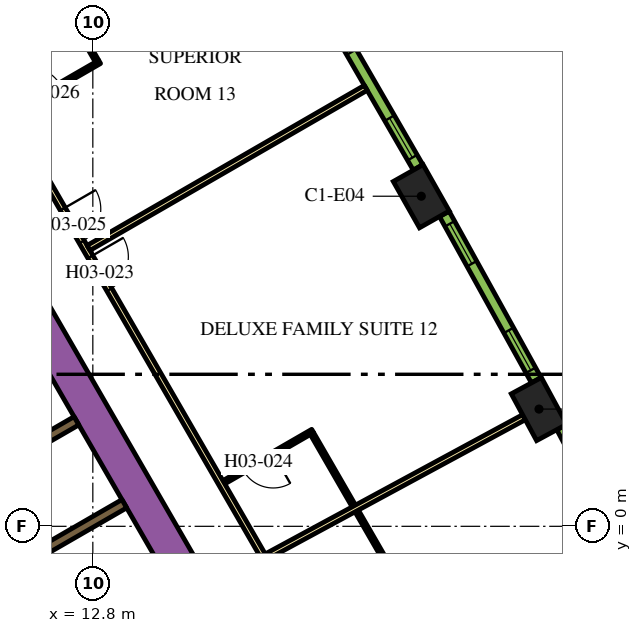
"""IFC4 building model, lengths in metres.
Left out: names, types, materials, properties, quantities, classifications, styles, units other than length and angle.
Written with IfcOpenShell. Run it as: python <this file> out.ifc"""

import sys

from ifc_helpers import new_model, si_unit, direction, frame, frame_2d, origin, origin_2d, place, context, subcontext, project, spatial, rectangle, extrude, element, fill, save


model = new_model("IFC4")
c1 = context("Model", 3, precision=1e-05, world=origin(), true_north=direction((0.0, 1.0)))
c2 = subcontext(c1, "Body", "Model", "MODEL_VIEW")
j1 = project(units=[si_unit("LENGTHUNIT", "METRE"), si_unit("PLANEANGLEUNIT", "RADIAN")], contexts=[c1])
p1 = place(None, origin())
s1 = spatial("IfcSite", under=j1, at=p1, CompositionType="ELEMENT")
p2 = place(p1, origin())
s2 = spatial("IfcBuilding", under=s1, at=p2, CompositionType="ELEMENT")
p3 = place(p2, frame((0.0, 0.0, 54.9)))
s3 = spatial("IfcBuildingStorey", under=s2, at=p3, CompositionType="ELEMENT", Elevation=54.9)
for number, where, z_axis, x_axis in (
    (1, (24.54, 3.085, 0.0), (0.0, 0.0, 1.0), (-0.476, 0.88, 0.0)),
    (2, (21.443, 8.685, 0.0), (0.0, 0.0, 1.0), (-0.492, 0.871, 0.0)),
):
    element("IfcColumn", number, at=place(p3, frame(where, z_axis=z_axis, x_axis=x_axis)), inside=s3, PredefinedType="COLUMN", context=c2, shape_type="SweptSolid", body=[
        extrude(rectangle(XDim=1.4, YDim=0.9, at=origin_2d()), origin(), (0.0, 0.0, 1.0), 3.9),
    ])
p4 = place(p3, frame((6.776, 13.364, 0.0), z_axis=(0.0, 0.0, 1.0), x_axis=(0.500004177138, -0.8660229921, 0.0)))
e3 = element("IfcWall", 3, at=p4, inside=s3, PredefinedType="SOLIDWALL", context=c2, shape_type="SweptSolid", body=[
    extrude(rectangle(XDim=20.204, YDim=0.9, at=frame_2d((10.102, 0.0))), origin(), (0.0, 0.0, 1.0), 3.9),
])
p5 = place(p3, frame((10.464, 1.677, 0.0), z_axis=(0.0, 0.0, 1.0), x_axis=(0.86605622881, 0.499946605688, 0.0)))
e4 = element("IfcWall", 4, at=p5, inside=s3, PredefinedType="SOLIDWALL", context=c2, shape_type="SweptSolid", body=[
    extrude(rectangle(XDim=2.2, YDim=0.25, at=frame_2d((1.1, 0.0))), origin(), (0.0, 0.0, 1.0), 3.9),
])
p6 = place(p3, frame((10.911, -0.975, 0.0), z_axis=(0.0, 0.0, 1.0), x_axis=(0.866046979468, 0.499962627957, 0.0)))
e5 = element("IfcWall", 5, at=p6, inside=s3, PredefinedType="SOLIDWALL", context=c2, shape_type="SweptSolid", body=[
    extrude(rectangle(XDim=3.138, YDim=0.25, at=frame_2d((1.569, 0.0))), origin(), (0.0, 0.0, 1.0), 3.9),
])
p7 = place(p3, frame((6.163, 18.475, 0.0), z_axis=(0.0, 0.0, 1.0), x_axis=(0.500001317485, -0.866024643133, 0.0)))
e6 = element("IfcWall", 6, at=p7, inside=s3, PredefinedType="PARTITIONING", context=c2, shape_type="SweptSolid", body=[
    extrude(rectangle(XDim=25.767, YDim=0.15, at=frame_2d((12.883, 0.0))), origin(), (0.0, 0.0, 1.0), 2.75),
])
p8 = place(p7, frame((24.586, 0.0, 0.0)))
e7 = element("IfcOpeningElement", 7, at=p8, cuts=e6, PredefinedType="OPENING", context=c2, shape_type="SweptSolid", body=[
    extrude(rectangle(XDim=1.0, YDim=2.1, at=frame_2d((0.5, 1.05))), frame((0.0, 0.085, 0.0), z_axis=(0.0, -1.0, 0.0), x_axis=(1.0, 0.0, 0.0)), (0.0, 0.0, 1.0), 0.17),
])
p9 = place(p7, frame((13.144, 0.0, 0.0)))
e8 = element("IfcOpeningElement", 8, at=p9, cuts=e6, PredefinedType="OPENING", context=c2, shape_type="SweptSolid", body=[
    extrude(rectangle(XDim=1.0, YDim=2.1, at=frame_2d((0.5, 1.05))), frame((0.0, 0.085, 0.0), z_axis=(0.0, -1.0, 0.0), x_axis=(1.0, 0.0, 0.0)), (0.0, 0.0, 1.0), 0.17),
])
p10 = place(p7, frame((11.692, 0.0, 0.0)))
e9 = element("IfcOpeningElement", 9, at=p10, cuts=e6, PredefinedType="OPENING", context=c2, shape_type="SweptSolid", body=[
    extrude(rectangle(XDim=1.0, YDim=2.1, at=frame_2d((0.5, 1.05))), frame((0.0, 0.085, 0.0), z_axis=(0.0, -1.0, 0.0), x_axis=(1.0, 0.0, 0.0)), (0.0, 0.0, 1.0), 0.17),
])
p11 = place(p7, frame((0.572, 0.0, 0.0)))
e10 = element("IfcOpeningElement", 10, at=p11, cuts=e6, PredefinedType="OPENING", context=c2, shape_type="SweptSolid", body=[
    extrude(rectangle(XDim=1.0, YDim=2.1, at=frame_2d((0.5, 1.05))), frame((0.0, 0.085, 0.0), z_axis=(0.0, -1.0, 0.0), x_axis=(1.0, 0.0, 0.0)), (0.0, 0.0, 1.0), 0.17),
])
p12 = place(p3, frame((19.982, 11.537, 0.0), z_axis=(0.0, 0.0, 1.0), x_axis=(-0.866020994654, -0.500007636761, 0.0)))
e11 = element("IfcWall", 11, at=p12, inside=s3, PredefinedType="PARTITIONING", context=c2, shape_type="SweptSolid", body=[
    extrude(rectangle(XDim=8.423, YDim=0.15, at=frame_2d((4.211, 0.0))), origin(), (0.0, 0.0, 1.0), 2.75),
])
p13 = place(p3, frame((24.145, 2.871, 0.0), z_axis=(0.0, 0.0, 1.0), x_axis=(-0.879551725039, -0.475803281809, 0.0)))
e12 = element("IfcWall", 12, at=p13, inside=s3, PredefinedType="PARTITIONING", context=c2, shape_type="SweptSolid", body=[
    extrude(rectangle(XDim=7.688, YDim=0.15, at=frame_2d((3.844, 0.0))), origin(), (0.0, 0.0, 1.0), 2.75),
])
p14 = place(p3, frame((20.716, -1.281, 0.0), z_axis=(0.0, 0.0, 1.0), x_axis=(-0.499969367985, 0.866043088465, 0.0)))
e13 = element("IfcWall", 13, at=p14, inside=s3, PredefinedType="PARTITIONING", context=c2, shape_type="SweptSolid", body=[
    extrude(rectangle(XDim=1.94, YDim=0.1, at=frame_2d((0.97, 0.0))), origin(), (0.0, 0.0, 1.0), 2.75),
])
p15 = place(p3, frame((18.586, 2.509, 0.0), z_axis=(0.0, 0.0, 1.0), x_axis=(-0.866059108428, -0.4999416173, 0.0)))
e14 = element("IfcWall", 14, at=p15, inside=s3, PredefinedType="PARTITIONING", context=c2, shape_type="SweptSolid", body=[
    extrude(rectangle(XDim=2.7, YDim=0.1, at=frame_2d((1.35, 0.0))), origin(), (0.0, 0.0, 1.0), 2.75),
])
p16 = place(p15, frame((1.2, 0.0, 0.0)))
e15 = element("IfcOpeningElement", 15, at=p16, cuts=e14, PredefinedType="OPENING", context=c2, shape_type="SweptSolid", body=[
    extrude(rectangle(XDim=0.9, YDim=2.1, at=frame_2d((0.45, 1.05))), frame((0.0, 0.06, 0.0), z_axis=(0.0, -1.0, 0.0), x_axis=(1.0, 0.0, 0.0)), (0.0, 0.0, 1.0), 0.12),
])
p17 = place(p3, frame((18.567, 2.441, 0.0), z_axis=(0.0, 0.0, 1.0), x_axis=(0.499946605688, -0.86605622881, 0.0)))
e16 = element("IfcWall", 16, at=p17, inside=s3, PredefinedType="PARTITIONING", context=c2, shape_type="SweptSolid", body=[
    extrude(rectangle(XDim=2.2, YDim=0.1, at=frame_2d((1.1, 0.0))), origin(), (0.0, 0.0, 1.0), 2.75),
])
p18 = place(p3, frame((10.64, 10.871, 0.0), z_axis=(0.0, 0.0, 1.0), x_axis=(0.866036505625, 0.499980770555, 0.0)))
e17 = element("IfcWall", 17, at=p18, inside=s3, PredefinedType="PARTITIONING", context=c2, shape_type="SweptSolid", body=[
    extrude(rectangle(XDim=2.7, YDim=0.1, at=frame_2d((1.35, 0.0))), origin(), (0.0, 0.0, 1.0), 2.75),
])
p19 = place(p18, frame((0.6, 0.0, 0.0)))
e18 = element("IfcOpeningElement", 18, at=p19, cuts=e17, PredefinedType="OPENING", context=c2, shape_type="SweptSolid", body=[
    extrude(rectangle(XDim=0.9, YDim=2.1, at=frame_2d((0.45, 1.05))), frame((0.0, 0.06, 0.0), z_axis=(0.0, -1.0, 0.0), x_axis=(1.0, 0.0, 0.0)), (0.0, 0.0, 1.0), 0.12),
])
p20 = place(p3, frame((12.91, 12.239, 0.0), z_axis=(0.0, 0.0, 1.0), x_axis=(-0.499957272447, 0.866050071143, 0.0)))
e19 = element("IfcWall", 19, at=p20, inside=s3, PredefinedType="PARTITIONING", context=c2, shape_type="SweptSolid", body=[
    extrude(rectangle(XDim=2.07, YDim=0.1, at=frame_2d((1.035, 0.0))), origin(), (0.0, 0.0, 1.0), 2.75),
])
p21 = place(p3, frame((27.475, -1.81, 0.0), z_axis=(0.0, 0.0, 1.0), x_axis=(-0.467629620899, 0.883924509026, 0.0)))
e20 = element("IfcWall", 20, at=p21, inside=s3, PredefinedType="SOLIDWALL", context=c2, shape_type="SweptSolid", body=[
    extrude(rectangle(XDim=4.998, YDim=0.29, at=frame_2d((2.499, 0.0))), origin(), (0.0, 0.0, 1.0), 3.65),
])
p22 = place(p21, frame((0.297, 0.0, 0.9)))
e21 = element("IfcOpeningElement", 21, at=p22, cuts=e20, PredefinedType="OPENING", context=c2, shape_type="SweptSolid", body=[
    extrude(rectangle(XDim=1.2, YDim=2.15, at=frame_2d((0.6, 1.075))), frame((0.0, 0.155, 0.0), z_axis=(0.0, -1.0, 0.0), x_axis=(1.0, 0.0, 0.0)), (0.0, 0.0, 1.0), 0.31),
])
p23 = place(p21, frame((3.501, 0.0, 0.9)))
e22 = element("IfcOpeningElement", 22, at=p23, cuts=e20, PredefinedType="OPENING", context=c2, shape_type="SweptSolid", body=[
    extrude(rectangle(XDim=1.2, YDim=2.15, at=frame_2d((0.6, 1.075))), frame((0.0, 0.155, 0.0), z_axis=(0.0, -1.0, 0.0), x_axis=(1.0, 0.0, 0.0)), (0.0, 0.0, 1.0), 0.31),
])
p24 = place(p3, frame((24.468, 3.846, 0.0), z_axis=(0.0, 0.0, 1.0), x_axis=(-0.483912572871, 0.875116347589, 0.0)))
e23 = element("IfcWall", 23, at=p24, inside=s3, PredefinedType="SOLIDWALL", context=c2, shape_type="SweptSolid", body=[
    extrude(rectangle(XDim=4.998, YDim=0.29, at=frame_2d((2.499, 0.0))), origin(), (0.0, 0.0, 1.0), 3.65),
])
p25 = place(p24, frame((0.297, 0.0, 0.9)))
e24 = element("IfcOpeningElement", 24, at=p25, cuts=e23, PredefinedType="OPENING", context=c2, shape_type="SweptSolid", body=[
    extrude(rectangle(XDim=1.2, YDim=2.15, at=frame_2d((0.6, 1.075))), frame((0.0, 0.155, 0.0), z_axis=(0.0, -1.0, 0.0), x_axis=(1.0, 0.0, 0.0)), (0.0, 0.0, 1.0), 0.31),
])
p26 = place(p24, frame((3.501, 0.0, 0.9)))
e25 = element("IfcOpeningElement", 25, at=p26, cuts=e23, PredefinedType="OPENING", context=c2, shape_type="SweptSolid", body=[
    extrude(rectangle(XDim=1.2, YDim=2.15, at=frame_2d((0.6, 1.075))), frame((0.0, 0.155, 0.0), z_axis=(0.0, -1.0, 0.0), x_axis=(1.0, 0.0, 0.0)), (0.0, 0.0, 1.0), 0.31),
])
p27 = place(p3, frame((21.357, 9.445, 0.0), z_axis=(0.0, 0.0, 1.0), x_axis=(-0.50002123722, 0.866013142123, 0.0)))
e26 = element("IfcWall", 26, at=p27, inside=s3, PredefinedType="SOLIDWALL", context=c2, shape_type="SweptSolid", body=[
    extrude(rectangle(XDim=4.998, YDim=0.29, at=frame_2d((2.499, 0.0))), origin(), (0.0, 0.0, 1.0), 3.65),
])
p28 = place(p27, frame((0.297, 0.0, 0.9)))
e27 = element("IfcOpeningElement", 27, at=p28, cuts=e26, PredefinedType="OPENING", context=c2, shape_type="SweptSolid", body=[
    extrude(rectangle(XDim=1.2, YDim=2.15, at=frame_2d((0.6, 1.075))), frame((0.0, 0.155, 0.0), z_axis=(0.0, -1.0, 0.0), x_axis=(1.0, 0.0, 0.0)), (0.0, 0.0, 1.0), 0.31),
])
p29 = place(p27, frame((3.501, 0.0, 0.9)))
e28 = element("IfcOpeningElement", 28, at=p29, cuts=e26, PredefinedType="OPENING", context=c2, shape_type="SweptSolid", body=[
    extrude(rectangle(XDim=1.2, YDim=2.15, at=frame_2d((0.6, 1.075))), frame((0.0, 0.155, 0.0), z_axis=(0.0, -1.0, 0.0), x_axis=(1.0, 0.0, 0.0)), (0.0, 0.0, 1.0), 0.31),
])
p30 = place(p9, origin())
e29 = element("IfcDoor", 29, at=p30, inside=s3, OperationType="SINGLE_SWING_LEFT", PredefinedType="DOOR", context=c2, shape_type="SweptSolid", body=[
    extrude(rectangle(XDim=1.0, YDim=2.1, at=frame_2d((0.5, 1.05))), frame((0.0, 0.025, 0.0), z_axis=(0.0, -1.0, 0.0), x_axis=(1.0, 0.0, 0.0)), (0.0, 0.0, 1.0), 0.05),
])
fill(e8, e29)
p31 = place(p16, origin())
e30 = element("IfcDoor", 30, at=p31, inside=s3, OperationType="SINGLE_SWING_RIGHT", PredefinedType="DOOR", context=c2, shape_type="SweptSolid", body=[
    extrude(rectangle(XDim=0.9, YDim=2.1, at=frame_2d((0.45, 1.05))), frame((0.0, 0.025, 0.0), z_axis=(0.0, -1.0, 0.0), x_axis=(1.0, 0.0, 0.0)), (0.0, 0.0, 1.0), 0.05),
])
fill(e15, e30)
p32 = place(p10, origin())
e31 = element("IfcDoor", 31, at=p32, inside=s3, OperationType="SINGLE_SWING_RIGHT", PredefinedType="DOOR", context=c2, shape_type="SweptSolid", body=[
    extrude(rectangle(XDim=1.0, YDim=2.1, at=frame_2d((0.5, 1.05))), frame((0.0, 0.025, 0.0), z_axis=(0.0, -1.0, 0.0), x_axis=(1.0, 0.0, 0.0)), (0.0, 0.0, 1.0), 0.05),
])
fill(e9, e31)
p33 = place(p19, origin())
e32 = element("IfcDoor", 32, at=p33, inside=s3, OperationType="SINGLE_SWING_LEFT", PredefinedType="DOOR", context=c2, shape_type="SweptSolid", body=[
    extrude(rectangle(XDim=0.9, YDim=2.1, at=frame_2d((0.45, 1.05))), frame((0.0, 0.025, 0.0), z_axis=(0.0, -1.0, 0.0), x_axis=(1.0, 0.0, 0.0)), (0.0, 0.0, 1.0), 0.05),
])
fill(e18, e32)
p34 = place(p25, origin())
e33 = element("IfcWindow", 33, at=p34, inside=s3, PartitioningType="DOUBLE_PANEL_VERTICAL", PredefinedType="WINDOW", context=c2, shape_type="SweptSolid", body=[
    extrude(rectangle(XDim=1.2, YDim=2.15, at=frame_2d((0.6, 1.075))), frame((0.0, 0.015, 0.0), z_axis=(0.0, -1.0, 0.0), x_axis=(1.0, 0.0, 0.0)), (0.0, 0.0, 1.0), 0.06),
])
fill(e24, e33)
p35 = place(p26, origin())
e34 = element("IfcWindow", 34, at=p35, inside=s3, PartitioningType="DOUBLE_PANEL_VERTICAL", PredefinedType="WINDOW", context=c2, shape_type="SweptSolid", body=[
    extrude(rectangle(XDim=1.2, YDim=2.15, at=frame_2d((0.6, 1.075))), frame((0.0, 0.015, 0.0), z_axis=(0.0, -1.0, 0.0), x_axis=(1.0, 0.0, 0.0)), (0.0, 0.0, 1.0), 0.06),
])
fill(e25, e34)
p36 = place(p28, origin())
e35 = element("IfcWindow", 35, at=p36, inside=s3, PartitioningType="DOUBLE_PANEL_VERTICAL", PredefinedType="WINDOW", context=c2, shape_type="SweptSolid", body=[
    extrude(rectangle(XDim=1.2, YDim=2.15, at=frame_2d((0.6, 1.075))), frame((0.0, 0.015, 0.0), z_axis=(0.0, -1.0, 0.0), x_axis=(1.0, 0.0, 0.0)), (0.0, 0.0, 1.0), 0.06),
])
fill(e27, e35)
save(model, sys.argv[1])
